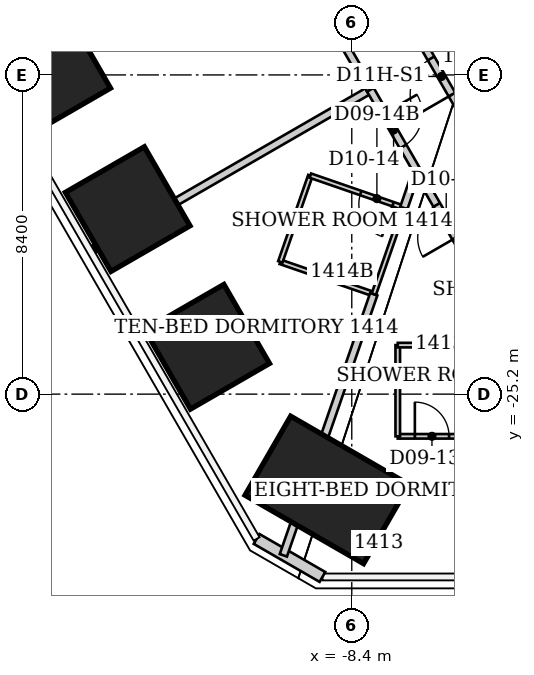
"""IFC4 building model, lengths in metres.
Left out: names, types, materials, properties, quantities, classifications, styles, units other than length and angle.
Written with IfcOpenShell. Run it as: python <this file> out.ifc"""

import sys

from ifc_helpers import new_model, si_unit, direction, frame, frame_2d, origin, origin_2d, place, context, subcontext, project, spatial, rectangle, extrude, element, fill, save


model = new_model("IFC4")
c1 = context("Model", 3, precision=1e-05, world=origin(), true_north=direction((0.0, 1.0)))
c2 = subcontext(c1, "Body", "Model", "MODEL_VIEW")
j1 = project(units=[si_unit("LENGTHUNIT", "METRE"), si_unit("PLANEANGLEUNIT", "RADIAN")], contexts=[c1])
p1 = place(None, origin())
s1 = spatial("IfcSite", under=j1, at=p1, CompositionType="ELEMENT")
p2 = place(p1, origin())
s2 = spatial("IfcBuilding", under=s1, at=p2, CompositionType="ELEMENT")
p3 = place(p2, frame((0.0, 0.0, 61.0)))
s3 = spatial("IfcBuildingStorey", under=s2, at=p3, CompositionType="ELEMENT", Elevation=61.0)
p4 = place(p3, frame((-9.049, -27.721, 0.0), z_axis=(0.014888146492, 0.045498689063, 0.998853448904), x_axis=(-0.500473089546, -0.864484190145, 0.046837715875)))
e1 = element("IfcColumn", 1, at=p4, inside=s3, PredefinedType="COLUMN", context=c2, shape_type="SweptSolid", body=[
    extrude(rectangle(XDim=2.4, YDim=3.6, at=origin_2d()), origin(), (0.0, 0.0, 1.0), 3.804),
])
p5 = place(p3, frame((-12.205, -23.954, 0.0), z_axis=(0.019833202316, 0.039024553425, 0.999041404705), x_axis=(-0.865370758954, -0.499786352777, 0.036702195118)))
e2 = element("IfcColumn", 2, at=p5, inside=s3, PredefinedType="COLUMN", context=c2, shape_type="SweptSolid", body=[
    extrude(rectangle(XDim=2.4, YDim=2.4, at=origin_2d()), origin(), (0.0, 0.0, 1.0), 3.804),
])
p6 = place(p3, frame((-14.297, -20.331, 0.0), z_axis=(0.02330242081, 0.033124102308, 0.999179558954), x_axis=(-0.865853874056, -0.498946587993, 0.036733787066)))
e3 = element("IfcColumn", 3, at=p6, inside=s3, PredefinedType="COLUMN", context=c2, shape_type="SweptSolid", body=[
    extrude(rectangle(XDim=2.4, YDim=2.4, at=origin_2d()), origin(), (0.0, 0.0, 1.0), 3.803),
])
p7 = place(p3, frame((-16.389, -16.708, 0.0), z_axis=(0.026707189651, 0.027220789452, 0.999272612775), x_axis=(-0.865695316087, -0.499221464256, 0.036736212807)))
e4 = element("IfcColumn", 4, at=p7, inside=s3, PredefinedType="COLUMN", context=c2, shape_type="SweptSolid", body=[
    extrude(rectangle(XDim=2.4, YDim=2.4, at=origin_2d()), origin(), (0.0, 0.0, 1.0), 3.803),
])
p8 = place(p3, frame((-9.172, -30.011, 0.0), z_axis=(0.0, 0.0, 1.0), x_axis=(-0.866010750942, 0.50002537861, 0.0)))
e5 = element("IfcWall", 5, at=p8, inside=s3, PredefinedType="SOLIDWALL", context=c2, shape_type="SweptSolid", body=[
    extrude(rectangle(XDim=2.0, YDim=0.3, at=frame_2d((1.0, 0.0))), origin(), (0.0, 0.0, 1.0), 3.64),
])
p9 = place(p3, frame((-15.176, -21.38, 0.0), z_axis=(0.0, 0.0, 1.0), x_axis=(0.866276837306, 0.49956425127, 0.0)))
e6 = element("IfcWall", 6, at=p9, inside=s3, PredefinedType="PARTITIONING", context=c2, shape_type="SweptSolid", body=[
    extrude(rectangle(XDim=8.373, YDim=0.2, at=frame_2d((4.186, 0.0))), origin(), (0.0, 0.0, 1.0), 3.64),
])
p10 = place(p3, frame((-11.06, -11.74, 0.0), z_axis=(0.0, 0.0, 1.0), x_axis=(0.50043073037, -0.865776578628, 0.0)))
e7 = element("IfcWall", 7, at=p10, inside=s3, PredefinedType="PARTITIONING", context=c2, shape_type="SweptSolid", body=[
    extrude(rectangle(XDim=6.295, YDim=0.2, at=frame_2d((3.147, 0.0))), origin(), (0.0, 0.0, 1.0), 3.64),
])
p11 = place(p10, frame((2.647, 0.0, 0.0)))
e8 = element("IfcOpeningElement", 8, at=p11, cuts=e7, PredefinedType="OPENING", context=c2, shape_type="SweptSolid", body=[
    extrude(rectangle(XDim=1.0, YDim=2.13, at=frame_2d((0.5, 1.065))), frame((0.0, 0.1, 0.0), z_axis=(0.0, -1.0, 0.0), x_axis=(1.0, 0.0, 0.0)), (0.0, 0.0, 1.0), 0.2),
])
p12 = place(p3, frame((-10.28, -21.72, 0.0), z_axis=(0.0, 0.0, 1.0), x_axis=(0.94515546045, -0.326620813149, 0.0)))
e9 = element("IfcWall", 9, at=p12, inside=s3, PredefinedType="PARTITIONING", context=c2, shape_type="SweptSolid", body=[
    extrude(rectangle(XDim=2.603, YDim=0.12, at=frame_2d((1.301, 0.0))), origin(), (0.0, 0.0, 1.0), 3.64),
])
p13 = place(p3, frame((-10.2, -29.442, 0.0), z_axis=(0.0, 0.0, 1.0), x_axis=(0.327154379454, 0.944970905374, 0.0)))
e10 = element("IfcWall", 10, at=p13, inside=s3, PredefinedType="PARTITIONING", context=c2, shape_type="SweptSolid", body=[
    extrude(rectangle(XDim=7.272, YDim=0.2, at=frame_2d((3.636, 0.0))), origin(), (0.0, 0.0, 1.0), 3.64),
])
p14 = place(p3, frame((-9.49, -19.45, 0.0), z_axis=(0.0, 0.0, 1.0), x_axis=(-0.328693963496, -0.944436487203, 0.0)))
e11 = element("IfcWall", 11, at=p14, inside=s3, PredefinedType="PARTITIONING", context=c2, shape_type="SweptSolid", body=[
    extrude(rectangle(XDim=2.404, YDim=0.12, at=frame_2d((1.202, 0.0))), origin(), (0.0, 0.0, 1.0), 3.64),
])
p15 = place(p3, frame((-7.91, -17.19, 0.0), z_axis=(0.0, 0.0, 1.0), x_axis=(0.498748634132, -0.866746675766, 0.0)))
e12 = element("IfcWall", 12, at=p15, inside=s3, PredefinedType="PARTITIONING", context=c2, shape_type="SweptSolid", body=[
    extrude(rectangle(XDim=2.446, YDim=0.2, at=frame_2d((1.223, 0.0))), origin(), (0.0, 0.0, 1.0), 3.64),
])
p16 = place(p15, frame((0.723, 0.0, 0.0)))
e13 = element("IfcOpeningElement", 13, at=p16, cuts=e12, PredefinedType="OPENING", context=c2, shape_type="SweptSolid", body=[
    extrude(rectangle(XDim=1.0, YDim=2.13, at=frame_2d((0.5, 1.065))), frame((0.0, 0.1, 0.0), z_axis=(0.0, -1.0, 0.0), x_axis=(1.0, 0.0, 0.0)), (0.0, 0.0, 1.0), 0.2),
])
p17 = place(p3, frame((-7.82, -22.57, 0.0), z_axis=(0.0, 0.0, 1.0), x_axis=(0.328693963496, 0.944436487203, 0.0)))
e14 = element("IfcWall", 14, at=p17, inside=s3, PredefinedType="PARTITIONING", context=c2, shape_type="SweptSolid", body=[
    extrude(rectangle(XDim=2.404, YDim=0.12, at=frame_2d((1.202, 0.0))), origin(), (0.0, 0.0, 1.0), 3.64),
])
p18 = place(p3, frame((-7.19, -26.31, 0.0), z_axis=(0.0, 0.0, 1.0), x_axis=(1.0, 0.0, 0.0)))
e15 = element("IfcWall", 15, at=p18, inside=s3, PredefinedType="PARTITIONING", context=c2, shape_type="SweptSolid", body=[
    extrude(rectangle(XDim=2.6, YDim=0.12, at=frame_2d((1.3, 0.0))), origin(), (0.0, 0.0, 1.0), 3.64),
])
p19 = place(p18, frame((0.45, 0.0, 0.0)))
e16 = element("IfcOpeningElement", 16, at=p19, cuts=e15, PredefinedType="OPENING", context=c2, shape_type="SweptSolid", body=[
    extrude(rectangle(XDim=0.9, YDim=2.03, at=frame_2d((0.45, 1.015))), frame((0.0, 0.06, 0.0), z_axis=(0.0, -1.0, 0.0), x_axis=(1.0, 0.0, 0.0)), (0.0, 0.0, 1.0), 0.12),
])
p20 = place(p3, frame((-7.19, -23.91, 0.0), z_axis=(0.0, 0.0, 1.0), x_axis=(0.0, -1.0, 0.0)))
e17 = element("IfcWall", 17, at=p20, inside=s3, PredefinedType="PARTITIONING", context=c2, shape_type="SweptSolid", body=[
    extrude(rectangle(XDim=2.4, YDim=0.12, at=frame_2d((1.2, 0.0))), origin(), (0.0, 0.0, 1.0), 3.64),
])
p21 = place(p3, frame((-7.03, -20.3, 0.0), z_axis=(0.0, 0.0, 1.0), x_axis=(-0.94515546045, 0.326620813149, 0.0)))
e18 = element("IfcWall", 18, at=p21, inside=s3, PredefinedType="PARTITIONING", context=c2, shape_type="SweptSolid", body=[
    extrude(rectangle(XDim=2.603, YDim=0.12, at=frame_2d((1.301, 0.0))), origin(), (0.0, 0.0, 1.0), 3.64),
])
p22 = place(p21, frame((0.3, 0.0, 0.0)))
e19 = element("IfcOpeningElement", 19, at=p22, cuts=e18, PredefinedType="OPENING", context=c2, shape_type="SweptSolid", body=[
    extrude(rectangle(XDim=0.9, YDim=2.03, at=frame_2d((0.45, 1.015))), frame((0.0, 0.06, 0.0), z_axis=(0.0, -1.0, 0.0), x_axis=(1.0, 0.0, 0.0)), (0.0, 0.0, 1.0), 0.12),
])
p23 = place(p3, frame((-7.03, -20.3, 0.0), z_axis=(0.0, 0.0, 1.0), x_axis=(0.324737408014, 0.94580421644, 0.0)))
e20 = element("IfcWall", 20, at=p23, inside=s3, PredefinedType="PARTITIONING", context=c2, shape_type="SweptSolid", body=[
    extrude(rectangle(XDim=0.937, YDim=0.2, at=frame_2d((0.468, 0.0))), origin(), (0.0, 0.0, 1.0), 3.64),
])
p24 = place(p3, frame((-6.69, -19.31, 0.0), z_axis=(0.0, 0.0, 1.0), x_axis=(0.499963722229, -0.866046347752, 0.0)))
e21 = element("IfcWall", 21, at=p24, inside=s3, PredefinedType="PARTITIONING", context=c2, shape_type="SweptSolid", body=[
    extrude(rectangle(XDim=2.54, YDim=0.2, at=frame_2d((1.27, 0.0))), origin(), (0.0, 0.0, 1.0), 3.64),
])
p25 = place(p24, frame((1.05, 0.0, 0.0)))
e22 = element("IfcOpeningElement", 22, at=p25, cuts=e21, PredefinedType="OPENING", context=c2, shape_type="SweptSolid", body=[
    extrude(rectangle(XDim=1.0, YDim=2.13, at=frame_2d((0.5, 1.065))), frame((0.0, 0.1, 0.0), z_axis=(0.0, -1.0, 0.0), x_axis=(1.0, 0.0, 0.0)), (0.0, 0.0, 1.0), 0.2),
])
p26 = place(p3, frame((-4.59, -23.91, 0.0), z_axis=(0.0, 0.0, 1.0), x_axis=(-1.0, 0.0, 0.0)))
e23 = element("IfcWall", 23, at=p26, inside=s3, PredefinedType="PARTITIONING", context=c2, shape_type="SweptSolid", body=[
    extrude(rectangle(XDim=2.6, YDim=0.12, at=frame_2d((1.3, 0.0))), origin(), (0.0, 0.0, 1.0), 3.64),
])
p27 = place(p3, frame((-4.38, -19.71, 0.0), z_axis=(0.0, 0.0, 1.0), x_axis=(-0.500523653757, 0.865722860984, 0.0)))
e24 = element("IfcWall", 24, at=p27, inside=s3, PredefinedType="PARTITIONING", context=c2, shape_type="SweptSolid", body=[
    extrude(rectangle(XDim=6.628, YDim=0.2, at=frame_2d((3.314, 0.0))), origin(), (0.0, 0.0, 1.0), 3.64),
])
p28 = place(p27, frame((2.764, 0.0, 0.0)))
e25 = element("IfcOpeningElement", 25, at=p28, cuts=e24, PredefinedType="OPENING", context=c2, shape_type="SweptSolid", body=[
    extrude(rectangle(XDim=1.1, YDim=2.2, at=frame_2d((0.55, 1.1))), frame((0.0, 0.1, 0.0), z_axis=(0.0, -1.0, 0.0), x_axis=(1.0, 0.0, 0.0)), (0.0, 0.0, 1.0), 0.2),
])
p29 = place(p25, origin())
e26 = element("IfcDoor", 26, at=p29, inside=s3, OperationType="SINGLE_SWING_RIGHT", PredefinedType="DOOR", context=c2, shape_type="SweptSolid", body=[
    extrude(rectangle(XDim=1.0, YDim=2.13, at=frame_2d((0.5, 1.065))), frame((0.0, 0.025, 0.0), z_axis=(0.0, -1.0, 0.0), x_axis=(1.0, 0.0, 0.0)), (0.0, 0.0, 1.0), 0.05),
])
fill(e22, e26)
p30 = place(p19, origin())
e27 = element("IfcDoor", 27, at=p30, inside=s3, OperationType="SINGLE_SWING_LEFT", PredefinedType="DOOR", context=c2, shape_type="SweptSolid", body=[
    extrude(rectangle(XDim=0.9, YDim=2.03, at=frame_2d((0.45, 1.015))), frame((0.0, 0.025, 0.0), z_axis=(0.0, -1.0, 0.0), x_axis=(1.0, 0.0, 0.0)), (0.0, 0.0, 1.0), 0.05),
])
fill(e16, e27)
p31 = place(p16, origin())
e28 = element("IfcDoor", 28, at=p31, inside=s3, OperationType="SINGLE_SWING_LEFT", PredefinedType="DOOR", context=c2, shape_type="SweptSolid", body=[
    extrude(rectangle(XDim=1.0, YDim=2.13, at=frame_2d((0.5, 1.065))), frame((0.0, 0.025, 0.0), z_axis=(0.0, -1.0, 0.0), x_axis=(1.0, 0.0, 0.0)), (0.0, 0.0, 1.0), 0.05),
])
fill(e13, e28)
p32 = place(p22, origin())
e29 = element("IfcDoor", 29, at=p32, inside=s3, OperationType="SINGLE_SWING_LEFT", PredefinedType="DOOR", context=c2, shape_type="SweptSolid", body=[
    extrude(rectangle(XDim=0.9, YDim=2.03, at=frame_2d((0.45, 1.015))), frame((0.0, 0.025, 0.0), z_axis=(0.0, -1.0, 0.0), x_axis=(1.0, 0.0, 0.0)), (0.0, 0.0, 1.0), 0.05),
])
fill(e19, e29)
p33 = place(p28, origin())
e30 = element("IfcDoor", 30, at=p33, inside=s3, OperationType="SINGLE_SWING_LEFT", PredefinedType="DOOR", context=c2, shape_type="SweptSolid", body=[
    extrude(rectangle(XDim=1.1, YDim=2.2, at=frame_2d((0.55, 1.1))), frame((0.0, 0.025, 0.0), z_axis=(0.0, -1.0, 0.0), x_axis=(1.0, 0.0, 0.0)), (0.0, 0.0, 1.0), 0.05),
])
fill(e25, e30)
save(model, sys.argv[1])
